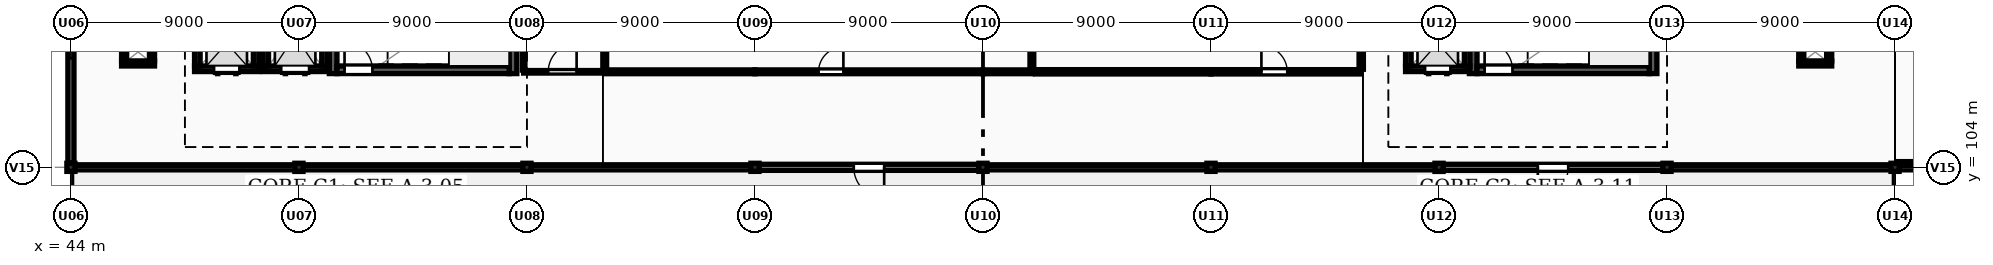
"""IFC4 building model, lengths in metres.
Left out: names, types, materials, properties, quantities, classifications, styles, units other than length and angle.
Written with IfcOpenShell. Run it as: python <this file> out.ifc"""

import sys

from ifc_helpers import new_model, si_unit, direction, frame, frame_2d, origin, origin_2d, place, context, subcontext, project, spatial, rectangle, extrude, element, fill, save


model = new_model("IFC4")
c1 = context("Model", 3, precision=1e-05, world=origin(), true_north=direction((0.0, 1.0)))
c2 = subcontext(c1, "Body", "Model", "MODEL_VIEW")
j1 = project(units=[si_unit("LENGTHUNIT", "METRE"), si_unit("PLANEANGLEUNIT", "RADIAN")], contexts=[c1])
p1 = place(None, origin())
s1 = spatial("IfcSite", under=j1, at=p1, CompositionType="ELEMENT")
p2 = place(p1, origin())
s2 = spatial("IfcBuilding", under=s1, at=p2, CompositionType="ELEMENT")
p3 = place(p2, frame((0.0, 0.0, 16.2)))
s3 = spatial("IfcBuildingStorey", under=s2, at=p3, CompositionType="ELEMENT", Elevation=16.2)
for number, where, z_axis, x_axis in (
    (1, (44.0, 104.0, 0.0), (0.0, 0.0, 1.0), (1.0, 0.0, 0.0)),
    (2, (53.0, 104.0, 0.0), (0.0, 0.0, 1.0), (1.0, 0.0, 0.0)),
    (3, (62.0, 104.0, 0.0), (0.0, 0.0, 1.0), (1.0, 0.0, 0.0)),
    (4, (71.0, 104.0, 0.0), (0.0, 0.0, 1.0), (1.0, 0.0, 0.0)),
    (5, (80.0, 104.0, 0.0), (0.0, 0.0, 1.0), (1.0, 0.0, 0.0)),
    (6, (89.0, 104.0, 0.0), (0.0, 0.0, 1.0), (1.0, 0.0, 0.0)),
    (7, (98.0, 104.0, 0.0), (0.0, 0.0, 1.0), (1.0, 0.0, 0.0)),
    (8, (107.0, 104.0, 0.0), (0.0, 0.0, 1.0), (1.0, 0.0, 0.0)),
    (9, (116.0, 104.0, 0.0), (0.0, 0.0, 1.0), (1.0, 0.0, 0.0)),
):
    element("IfcColumn", number, at=place(p3, frame(where, z_axis=z_axis, x_axis=x_axis)), inside=s3, PredefinedType="COLUMN", context=c2, shape_type="SweptSolid", body=[
        extrude(rectangle(XDim=0.32, YDim=0.32, at=origin_2d()), origin(), (0.0, 0.0, 1.0), 3.9),
    ])
p4 = place(p3, frame((115.84, 104.0, 0.0), z_axis=(0.0, 0.0, 1.0), x_axis=(-1.0, 0.0, 0.0)))
e10 = element("IfcWall", 10, at=p4, inside=s3, PredefinedType="SOLIDWALL", context=c2, shape_type="SweptSolid", body=[
    extrude(rectangle(XDim=8.68, YDim=0.2, at=frame_2d((4.34, 0.0))), origin(), (0.0, 0.0, 1.0), 0.95),
])
p5 = place(p3, frame((106.84, 104.0, 0.0), z_axis=(0.0, 0.0, 1.0), x_axis=(-1.0, 0.0, 0.0)))
e11 = element("IfcWall", 11, at=p5, inside=s3, PredefinedType="SOLIDWALL", context=c2, shape_type="SweptSolid", body=[
    extrude(rectangle(XDim=8.68, YDim=0.24, at=frame_2d((4.34, 0.0))), origin(), (0.0, 0.0, 1.0), 3.01),
])
p6 = place(p5, frame((3.74, 0.0, 0.0)))
e12 = element("IfcOpeningElement", 12, at=p6, cuts=e11, PredefinedType="OPENING", context=c2, shape_type="SweptSolid", body=[
    extrude(rectangle(XDim=1.2, YDim=2.15, at=frame_2d((0.6, 1.075))), frame((0.0, 0.13, 0.0), z_axis=(0.0, -1.0, 0.0), x_axis=(1.0, 0.0, 0.0)), (0.0, 0.0, 1.0), 0.26),
])
for number, where, z_axis, x_axis in (
    (13, (97.84, 104.0, 0.0), (0.0, 0.0, 1.0), (-1.0, 0.0, 0.0)),
    (14, (88.84, 104.0, 0.0), (0.0, 0.0, 1.0), (-1.0, 0.0, 0.0)),
):
    element("IfcWall", number, at=place(p3, frame(where, z_axis=z_axis, x_axis=x_axis)), inside=s3, PredefinedType="SOLIDWALL", context=c2, shape_type="SweptSolid", body=[
        extrude(rectangle(XDim=8.68, YDim=0.2, at=frame_2d((4.34, 0.0))), origin(), (0.0, 0.0, 1.0), 0.95),
    ])
p7 = place(p3, frame((79.84, 104.0, 0.0), z_axis=(0.0, 0.0, 1.0), x_axis=(-1.0, 0.0, 0.0)))
e15 = element("IfcWall", 15, at=p7, inside=s3, PredefinedType="SOLIDWALL", context=c2, shape_type="SweptSolid", body=[
    extrude(rectangle(XDim=8.68, YDim=0.24, at=frame_2d((4.34, 0.0))), origin(), (0.0, 0.0, 1.0), 3.01),
])
p8 = place(p7, frame((3.74, 0.0, 0.0)))
e16 = element("IfcOpeningElement", 16, at=p8, cuts=e15, PredefinedType="OPENING", context=c2, shape_type="SweptSolid", body=[
    extrude(rectangle(XDim=1.2, YDim=2.15, at=frame_2d((0.6, 1.075))), frame((0.0, 0.13, 0.0), z_axis=(0.0, -1.0, 0.0), x_axis=(1.0, 0.0, 0.0)), (0.0, 0.0, 1.0), 0.26),
])
for number, where, z_axis, x_axis in (
    (17, (70.84, 104.0, 0.0), (0.0, 0.0, 1.0), (-1.0, 0.0, 0.0)),
    (18, (61.84, 104.0, 0.0), (0.0, 0.0, 1.0), (-1.0, 0.0, 0.0)),
    (19, (52.84, 104.0, 0.0), (0.0, 0.0, 1.0), (-1.0, 0.0, 0.0)),
):
    element("IfcWall", number, at=place(p3, frame(where, z_axis=z_axis, x_axis=x_axis)), inside=s3, PredefinedType="SOLIDWALL", context=c2, shape_type="SweptSolid", body=[
        extrude(rectangle(XDim=8.68, YDim=0.2, at=frame_2d((4.34, 0.0))), origin(), (0.0, 0.0, 1.0), 0.95),
    ])
p9 = place(p3, frame((44.0, 104.16, 0.0), z_axis=(0.0, 0.0, 1.0), x_axis=(0.0, 1.0, 0.0)))
e20 = element("IfcWall", 20, at=p9, inside=s3, PredefinedType="SOLIDWALL", context=c2, shape_type="SweptSolid", body=[
    extrude(rectangle(XDim=7.68, YDim=0.24, at=frame_2d((3.84, 0.0))), origin(), (0.0, 0.0, 1.0), 3.29),
])
p10 = place(p9, frame((4.14, 0.0, 0.95)))
e21 = element("IfcOpeningElement", 21, at=p10, cuts=e20, PredefinedType="OPENING", context=c2, shape_type="SweptSolid", body=[
    extrude(rectangle(XDim=1.2, YDim=1.65, at=frame_2d((0.6, 0.825))), frame((0.0, 0.13, 0.0), z_axis=(0.0, -1.0, 0.0), x_axis=(1.0, 0.0, 0.0)), (0.0, 0.0, 1.0), 0.26),
])
p11 = place(p3, frame((126.84, 104.0, 0.0), z_axis=(0.0, 0.0, 1.0), x_axis=(-1.0, 0.0, 0.0)))
e22 = element("IfcWall", 22, at=p11, inside=s3, PredefinedType="SOLIDWALL", context=c2, shape_type="SweptSolid", body=[
    extrude(rectangle(XDim=10.68, YDim=0.2, at=frame_2d((5.34, 0.0))), origin(), (0.0, 0.0, 1.0), 0.95),
])
p12 = place(p3, frame((116.1, 104.15, 3.9), z_axis=(0.0, 0.0, 1.0), x_axis=(1.0, 0.0, 0.0)))
e23 = element("IfcWall", 23, at=p12, inside=s3, PredefinedType="PARAPET", context=c2, shape_type="SweptSolid", body=[
    extrude(rectangle(XDim=17.8, YDim=0.15, at=frame_2d((8.9, 0.0))), origin(), (0.0, 0.0, 1.0), 0.95),
])
for number, where, z_axis, x_axis in (
    (24, (54.35, 107.7, 0.0), (0.0, 0.0, 1.0), (0.0, 1.0, 0.0)),
    (25, (61.45, 111.8, 0.0), (0.0, 0.0, 1.0), (0.0, -1.0, 0.0)),
):
    element("IfcWall", number, at=place(p3, frame(where, z_axis=z_axis, x_axis=x_axis)), inside=s3, PredefinedType="SHEAR", context=c2, shape_type="SweptSolid", body=[
        extrude(rectangle(XDim=4.1, YDim=0.3, at=frame_2d((2.05, 0.0))), origin(), (0.0, 0.0, 1.0), 3.65),
    ])
p13 = place(p3, frame((54.5, 107.85, 0.0), z_axis=(0.0, 0.0, 1.0), x_axis=(1.0, 0.0, 0.0)))
e26 = element("IfcWall", 26, at=p13, inside=s3, PredefinedType="SHEAR", context=c2, shape_type="SweptSolid", body=[
    extrude(rectangle(XDim=6.8, YDim=0.3, at=frame_2d((3.4, 0.0))), origin(), (0.0, 0.0, 1.0), 3.65),
])
p14 = place(p13, frame((0.3, 0.0, 0.0)))
e27 = element("IfcOpeningElement", 27, at=p14, cuts=e26, PredefinedType="OPENING", context=c2, shape_type="SweptSolid", body=[
    extrude(rectangle(XDim=1.1, YDim=2.15, at=frame_2d((0.55, 1.075))), frame((0.0, 0.16, 0.0), z_axis=(0.0, -1.0, 0.0), x_axis=(1.0, 0.0, 0.0)), (0.0, 0.0, 1.0), 0.32),
])
p15 = place(p3, frame((54.12, 107.89, 0.0), z_axis=(0.0, 0.0, 1.0), x_axis=(-1.0, 0.0, 0.0)))
e28 = element("IfcWall", 28, at=p15, inside=s3, PredefinedType="SHEAR", context=c2, shape_type="SweptSolid", body=[
    extrude(rectangle(XDim=2.54, YDim=0.22, at=frame_2d((1.27, 0.0))), origin(), (0.0, 0.0, 1.0), 3.65),
])
p16 = place(p15, frame((0.72, 0.0, 0.0)))
e29 = element("IfcOpeningElement", 29, at=p16, cuts=e28, PredefinedType="OPENING", context=c2, shape_type="SweptSolid", body=[
    extrude(rectangle(XDim=1.1, YDim=2.15, at=frame_2d((0.55, 1.075))), frame((0.0, 0.12, 0.0), z_axis=(0.0, -1.0, 0.0), x_axis=(1.0, 0.0, 0.0)), (0.0, 0.0, 1.0), 0.24),
])
for number, where, z_axis, x_axis in (
    (30, (51.69, 108.0, 0.0), (0.0, 0.0, 1.0), (0.0, 1.0, 0.0)),
    (31, (54.01, 110.9, 0.0), (0.0, 0.0, 1.0), (0.0, -1.0, 0.0)),
):
    element("IfcWall", number, at=place(p3, frame(where, z_axis=z_axis, x_axis=x_axis)), inside=s3, PredefinedType="SHEAR", context=c2, shape_type="SweptSolid", body=[
        extrude(rectangle(XDim=2.9, YDim=0.22, at=frame_2d((1.45, 0.0))), origin(), (0.0, 0.0, 1.0), 3.65),
    ])
p17 = place(p3, frame((51.42, 107.89, 0.0), z_axis=(0.0, 0.0, 1.0), x_axis=(-1.0, 0.0, 0.0)))
e32 = element("IfcWall", 32, at=p17, inside=s3, PredefinedType="SHEAR", context=c2, shape_type="SweptSolid", body=[
    extrude(rectangle(XDim=2.54, YDim=0.22, at=frame_2d((1.27, 0.0))), origin(), (0.0, 0.0, 1.0), 3.65),
])
p18 = place(p17, frame((0.77, 0.0, 0.0)))
e33 = element("IfcOpeningElement", 33, at=p18, cuts=e32, PredefinedType="OPENING", context=c2, shape_type="SweptSolid", body=[
    extrude(rectangle(XDim=1.0, YDim=2.15, at=frame_2d((0.5, 1.075))), frame((0.0, 0.12, 0.0), z_axis=(0.0, -1.0, 0.0), x_axis=(1.0, 0.0, 0.0)), (0.0, 0.0, 1.0), 0.24),
])
for number, where, z_axis, x_axis in (
    (34, (48.99, 108.0, 0.0), (0.0, 0.0, 1.0), (0.0, 1.0, 0.0)),
    (35, (51.31, 110.3, 0.0), (0.0, 0.0, 1.0), (0.0, -1.0, 0.0)),
):
    element("IfcWall", number, at=place(p3, frame(where, z_axis=z_axis, x_axis=x_axis)), inside=s3, PredefinedType="SHEAR", context=c2, shape_type="SweptSolid", body=[
        extrude(rectangle(XDim=2.3, YDim=0.22, at=frame_2d((1.15, 0.0))), origin(), (0.0, 0.0, 1.0), 3.65),
    ])
for number, where, z_axis, x_axis in (
    (36, (99.35, 107.7, 0.0), (0.0, 0.0, 1.0), (0.0, 1.0, 0.0)),
    (37, (106.45, 111.8, 0.0), (0.0, 0.0, 1.0), (0.0, -1.0, 0.0)),
):
    element("IfcWall", number, at=place(p3, frame(where, z_axis=z_axis, x_axis=x_axis)), inside=s3, PredefinedType="SHEAR", context=c2, shape_type="SweptSolid", body=[
        extrude(rectangle(XDim=4.1, YDim=0.3, at=frame_2d((2.05, 0.0))), origin(), (0.0, 0.0, 1.0), 3.65),
    ])
p19 = place(p3, frame((99.5, 107.85, 0.0), z_axis=(0.0, 0.0, 1.0), x_axis=(1.0, 0.0, 0.0)))
e38 = element("IfcWall", 38, at=p19, inside=s3, PredefinedType="SHEAR", context=c2, shape_type="SweptSolid", body=[
    extrude(rectangle(XDim=6.8, YDim=0.3, at=frame_2d((3.4, 0.0))), origin(), (0.0, 0.0, 1.0), 3.65),
])
p20 = place(p19, frame((0.3, 0.0, 0.0)))
e39 = element("IfcOpeningElement", 39, at=p20, cuts=e38, PredefinedType="OPENING", context=c2, shape_type="SweptSolid", body=[
    extrude(rectangle(XDim=1.1, YDim=2.15, at=frame_2d((0.55, 1.075))), frame((0.0, 0.16, 0.0), z_axis=(0.0, -1.0, 0.0), x_axis=(1.0, 0.0, 0.0)), (0.0, 0.0, 1.0), 0.32),
])
p21 = place(p3, frame((99.22, 107.89, 0.0), z_axis=(0.0, 0.0, 1.0), x_axis=(-1.0, 0.0, 0.0)))
e40 = element("IfcWall", 40, at=p21, inside=s3, PredefinedType="SHEAR", context=c2, shape_type="SweptSolid", body=[
    extrude(rectangle(XDim=2.54, YDim=0.22, at=frame_2d((1.27, 0.0))), origin(), (0.0, 0.0, 1.0), 3.65),
])
p22 = place(p21, frame((0.77, 0.0, 0.0)))
e41 = element("IfcOpeningElement", 41, at=p22, cuts=e40, PredefinedType="OPENING", context=c2, shape_type="SweptSolid", body=[
    extrude(rectangle(XDim=1.0, YDim=2.15, at=frame_2d((0.5, 1.075))), frame((0.0, 0.12, 0.0), z_axis=(0.0, -1.0, 0.0), x_axis=(1.0, 0.0, 0.0)), (0.0, 0.0, 1.0), 0.24),
])
for number, where, z_axis, x_axis in (
    (42, (96.79, 108.0, 0.0), (0.0, 0.0, 1.0), (0.0, 1.0, 0.0)),
    (43, (99.11, 110.3, 0.0), (0.0, 0.0, 1.0), (0.0, -1.0, 0.0)),
):
    element("IfcWall", number, at=place(p3, frame(where, z_axis=z_axis, x_axis=x_axis)), inside=s3, PredefinedType="SHEAR", context=c2, shape_type="SweptSolid", body=[
        extrude(rectangle(XDim=2.3, YDim=0.22, at=frame_2d((1.15, 0.0))), origin(), (0.0, 0.0, 1.0), 3.65),
    ])
p23 = place(p3, frame((47.3, 108.1, 0.0), z_axis=(0.0, 0.0, 1.0), x_axis=(-1.0, 0.0, 0.0)))
e44 = element("IfcWall", 44, at=p23, inside=s3, PredefinedType="PARTITIONING", context=c2, shape_type="SweptSolid", body=[
    extrude(rectangle(XDim=1.3, YDim=0.2, at=frame_2d((0.65, 0.0))), origin(), (0.0, 0.0, 1.0), 3.65),
])
p24 = place(p3, frame((46.1, 108.2, 0.0), z_axis=(0.0, 0.0, 1.0), x_axis=(0.0, 1.0, 0.0)))
e45 = element("IfcWall", 45, at=p24, inside=s3, PredefinedType="PARTITIONING", context=c2, shape_type="SweptSolid", body=[
    extrude(rectangle(XDim=0.7, YDim=0.2, at=frame_2d((0.35, 0.0))), origin(), (0.0, 0.0, 1.0), 3.65),
])
p25 = place(p3, frame((47.2, 108.9, 0.0), z_axis=(0.0, 0.0, 1.0), x_axis=(0.0, -1.0, 0.0)))
e46 = element("IfcWall", 46, at=p25, inside=s3, PredefinedType="PARTITIONING", context=c2, shape_type="SweptSolid", body=[
    extrude(rectangle(XDim=0.7, YDim=0.2, at=frame_2d((0.35, 0.0))), origin(), (0.0, 0.0, 1.0), 3.25),
])
p26 = place(p3, frame((113.5, 108.1, 0.0), z_axis=(0.0, 0.0, 1.0), x_axis=(-1.0, 0.0, 0.0)))
e47 = element("IfcWall", 47, at=p26, inside=s3, PredefinedType="PARTITIONING", context=c2, shape_type="SweptSolid", body=[
    extrude(rectangle(XDim=1.3, YDim=0.2, at=frame_2d((0.65, 0.0))), origin(), (0.0, 0.0, 1.0), 3.65),
])
for number, where, z_axis, x_axis in (
    (48, (112.3, 108.2, 0.0), (0.0, 0.0, 1.0), (0.0, 1.0, 0.0)),
    (49, (113.4, 108.9, 0.0), (0.0, 0.0, 1.0), (0.0, -1.0, 0.0)),
):
    element("IfcWall", number, at=place(p3, frame(where, z_axis=z_axis, x_axis=x_axis)), inside=s3, PredefinedType="PARTITIONING", context=c2, shape_type="SweptSolid", body=[
        extrude(rectangle(XDim=0.7, YDim=0.2, at=frame_2d((0.35, 0.0))), origin(), (0.0, 0.0, 1.0), 3.65),
    ])
p27 = place(p3, frame((65.07, 107.77, 0.0), z_axis=(0.0, 0.0, 1.0), x_axis=(1.0, 0.0, 0.0)))
e50 = element("IfcWall", 50, at=p27, inside=s3, PredefinedType="PARTITIONING", context=c2, shape_type="SweptSolid", body=[
    extrude(rectangle(XDim=5.93, YDim=0.15, at=frame_2d((2.965, 0.0))), origin(), (0.0, 0.0, 1.0), 3.65),
])
p28 = place(p3, frame((71.0, 107.77, 0.0), z_axis=(0.0, 0.0, 1.0), x_axis=(1.0, 0.0, 0.0)))
e51 = element("IfcWall", 51, at=p28, inside=s3, PredefinedType="PARTITIONING", context=c2, shape_type="SweptSolid", body=[
    extrude(rectangle(XDim=9.0, YDim=0.15, at=frame_2d((4.5, 0.0))), origin(), (0.0, 0.0, 1.0), 3.65),
])
p29 = place(p28, frame((2.51, 0.0, 0.0)))
e52 = element("IfcOpeningElement", 52, at=p29, cuts=e51, PredefinedType="OPENING", context=c2, shape_type="SweptSolid", body=[
    extrude(rectangle(XDim=0.98, YDim=2.1, at=frame_2d((0.49, 1.05))), frame((0.0, 0.085, 0.0), z_axis=(0.0, -1.0, 0.0), x_axis=(1.0, 0.0, 0.0)), (0.0, 0.0, 1.0), 0.17),
])
p30 = place(p3, frame((80.0, 107.77, 0.0), z_axis=(0.0, 0.0, 1.0), x_axis=(1.0, 0.0, 0.0)))
e53 = element("IfcWall", 53, at=p30, inside=s3, PredefinedType="PARTITIONING", context=c2, shape_type="SweptSolid", body=[
    extrude(rectangle(XDim=1.93, YDim=0.15, at=frame_2d((0.965, 0.0))), origin(), (0.0, 0.0, 1.0), 3.65),
])
for number, where, z_axis, x_axis in (
    (54, (65.07, 107.86, 0.0), (0.0, 0.0, 1.0), (0.0, 1.0, 0.0)),
    (55, (81.93, 107.86, 0.0), (0.0, 0.0, 1.0), (0.0, 1.0, 0.0)),
):
    element("IfcWall", number, at=place(p3, frame(where, z_axis=z_axis, x_axis=x_axis)), inside=s3, PredefinedType="PARTITIONING", context=c2, shape_type="SweptSolid", body=[
        extrude(rectangle(XDim=4.14, YDim=0.15, at=frame_2d((2.07, 0.0))), origin(), (0.0, 0.0, 1.0), 3.65),
    ])
p31 = place(p3, frame((82.07, 107.77, 0.0), z_axis=(0.0, 0.0, 1.0), x_axis=(1.0, 0.0, 0.0)))
e56 = element("IfcWall", 56, at=p31, inside=s3, PredefinedType="PARTITIONING", context=c2, shape_type="SweptSolid", body=[
    extrude(rectangle(XDim=6.93, YDim=0.17, at=frame_2d((3.465, 0.0))), origin(), (0.0, 0.0, 1.0), 3.65),
])
p32 = place(p3, frame((89.0, 107.77, 0.0), z_axis=(0.0, 0.0, 1.0), x_axis=(1.0, 0.0, 0.0)))
e57 = element("IfcWall", 57, at=p32, inside=s3, PredefinedType="PARTITIONING", context=c2, shape_type="SweptSolid", body=[
    extrude(rectangle(XDim=5.93, YDim=0.17, at=frame_2d((2.965, 0.0))), origin(), (0.0, 0.0, 1.0), 3.65),
])
p33 = place(p32, frame((1.99, 0.0, 0.0)))
e58 = element("IfcOpeningElement", 58, at=p33, cuts=e57, PredefinedType="OPENING", context=c2, shape_type="SweptSolid", body=[
    extrude(rectangle(XDim=1.02, YDim=2.1, at=frame_2d((0.51, 1.05))), frame((0.0, 0.095, 0.0), z_axis=(0.0, -1.0, 0.0), x_axis=(1.0, 0.0, 0.0)), (0.0, 0.0, 1.0), 0.19),
])
p34 = place(p3, frame((94.93, 107.87, 0.0), z_axis=(0.0, 0.0, 1.0), x_axis=(0.0, 1.0, 0.0)))
e59 = element("IfcWall", 59, at=p34, inside=s3, PredefinedType="PARTITIONING", context=c2, shape_type="SweptSolid", body=[
    extrude(rectangle(XDim=4.13, YDim=0.17, at=frame_2d((2.065, 0.0))), origin(), (0.0, 0.0, 1.0), 3.248),
])
p35 = place(p3, frame((61.87, 107.77, 0.0), z_axis=(0.0, 0.0, 1.0), x_axis=(1.0, 0.0, 0.0)))
e60 = element("IfcWall", 60, at=p35, inside=s3, PredefinedType="PARTITIONING", context=c2, shape_type="SweptSolid", body=[
    extrude(rectangle(XDim=3.06, YDim=0.1, at=frame_2d((1.53, 0.0))), origin(), (0.0, 0.0, 1.0), 3.65),
])
p36 = place(p35, frame((0.97, 0.0, 0.0)))
e61 = element("IfcOpeningElement", 61, at=p36, cuts=e60, PredefinedType="OPENING", context=c2, shape_type="SweptSolid", body=[
    extrude(rectangle(XDim=1.12, YDim=2.15, at=frame_2d((0.56, 1.075))), frame((0.0, 0.06, 0.0), z_axis=(0.0, -1.0, 0.0), x_axis=(1.0, 0.0, 0.0)), (0.0, 0.0, 1.0), 0.12),
])
p37 = place(p3, frame((61.87, 107.835, 0.0), z_axis=(0.0, 0.0, 1.0), x_axis=(0.0, 1.0, 0.0)))
e62 = element("IfcWall", 62, at=p37, inside=s3, PredefinedType="PARTITIONING", context=c2, shape_type="SweptSolid", body=[
    extrude(rectangle(XDim=3.99, YDim=0.1, at=frame_2d((1.995, 0.0))), origin(), (0.0, 0.0, 1.0), 3.65),
])
p38 = place(p6, origin())
e63 = element("IfcDoor", 63, at=p38, inside=s3, OperationType="SINGLE_SWING_RIGHT", PredefinedType="DOOR", context=c2, shape_type="SweptSolid", body=[
    extrude(rectangle(XDim=1.2, YDim=2.15, at=frame_2d((0.6, 1.075))), frame((0.0, 0.025, 0.0), z_axis=(0.0, -1.0, 0.0), x_axis=(1.0, 0.0, 0.0)), (0.0, 0.0, 1.0), 0.05),
])
fill(e12, e63)
p39 = place(p8, origin())
e64 = element("IfcDoor", 64, at=p39, inside=s3, OperationType="SINGLE_SWING_LEFT", PredefinedType="DOOR", context=c2, shape_type="SweptSolid", body=[
    extrude(rectangle(XDim=1.2, YDim=2.15, at=frame_2d((0.6, 1.075))), frame((0.0, 0.025, 0.0), z_axis=(0.0, -1.0, 0.0), x_axis=(1.0, 0.0, 0.0)), (0.0, 0.0, 1.0), 0.05),
])
fill(e16, e64)
p40 = place(p10, origin())
e65 = element("IfcWindow", 65, at=p40, inside=s3, PartitioningType="SINGLE_PANEL", PredefinedType="WINDOW", context=c2, shape_type="SweptSolid", body=[
    extrude(rectangle(XDim=1.2, YDim=1.65, at=frame_2d((0.6, 0.825))), frame((0.0, 0.03, 0.0), z_axis=(0.0, -1.0, 0.0), x_axis=(1.0, 0.0, 0.0)), (0.0, 0.0, 1.0), 0.06),
])
fill(e21, e65)
p41 = place(p14, origin())
e66 = element("IfcDoor", 66, at=p41, inside=s3, OperationType="SINGLE_SWING_LEFT", PredefinedType="DOOR", context=c2, shape_type="SweptSolid", body=[
    extrude(rectangle(XDim=1.1, YDim=2.15, at=frame_2d((0.55, 1.075))), frame((0.0, 0.025, 0.0), z_axis=(0.0, -1.0, 0.0), x_axis=(1.0, 0.0, 0.0)), (0.0, 0.0, 1.0), 0.05),
])
fill(e27, e66)
p42 = place(p16, origin())
e67 = element("IfcDoor", 67, at=p42, inside=s3, OperationType="DOUBLE_DOOR_SLIDING", PredefinedType="DOOR", context=c2, shape_type="SweptSolid", body=[
    extrude(rectangle(XDim=1.1, YDim=2.15, at=frame_2d((0.55, 1.075))), frame((0.0, 0.025, 0.0), z_axis=(0.0, -1.0, 0.0), x_axis=(1.0, 0.0, 0.0)), (0.0, 0.0, 1.0), 0.05),
])
fill(e29, e67)
p43 = place(p18, origin())
e68 = element("IfcDoor", 68, at=p43, inside=s3, OperationType="DOUBLE_DOOR_SLIDING", PredefinedType="DOOR", context=c2, shape_type="SweptSolid", body=[
    extrude(rectangle(XDim=1.0, YDim=2.15, at=frame_2d((0.5, 1.075))), frame((0.0, 0.025, 0.0), z_axis=(0.0, -1.0, 0.0), x_axis=(1.0, 0.0, 0.0)), (0.0, 0.0, 1.0), 0.05),
])
fill(e33, e68)
p44 = place(p20, origin())
e69 = element("IfcDoor", 69, at=p44, inside=s3, OperationType="SINGLE_SWING_LEFT", PredefinedType="DOOR", context=c2, shape_type="SweptSolid", body=[
    extrude(rectangle(XDim=1.1, YDim=2.15, at=frame_2d((0.55, 1.075))), frame((0.0, 0.025, 0.0), z_axis=(0.0, -1.0, 0.0), x_axis=(1.0, 0.0, 0.0)), (0.0, 0.0, 1.0), 0.05),
])
fill(e39, e69)
p45 = place(p22, origin())
e70 = element("IfcDoor", 70, at=p45, inside=s3, OperationType="DOUBLE_DOOR_SLIDING", PredefinedType="DOOR", context=c2, shape_type="SweptSolid", body=[
    extrude(rectangle(XDim=1.0, YDim=2.15, at=frame_2d((0.5, 1.075))), frame((0.0, 0.025, 0.0), z_axis=(0.0, -1.0, 0.0), x_axis=(1.0, 0.0, 0.0)), (0.0, 0.0, 1.0), 0.05),
])
fill(e41, e70)
p46 = place(p29, origin())
e71 = element("IfcDoor", 71, at=p46, inside=s3, OperationType="SINGLE_SWING_RIGHT", PredefinedType="DOOR", context=c2, shape_type="SweptSolid", body=[
    extrude(rectangle(XDim=0.98, YDim=2.1, at=frame_2d((0.49, 1.05))), frame((0.0, 0.025, 0.0), z_axis=(0.0, -1.0, 0.0), x_axis=(1.0, 0.0, 0.0)), (0.0, 0.0, 1.0), 0.05),
])
fill(e52, e71)
p47 = place(p33, origin())
e72 = element("IfcDoor", 72, at=p47, inside=s3, OperationType="SINGLE_SWING_LEFT", PredefinedType="DOOR", context=c2, shape_type="SweptSolid", body=[
    extrude(rectangle(XDim=1.02, YDim=2.1, at=frame_2d((0.51, 1.05))), frame((0.0, 0.025, 0.0), z_axis=(0.0, -1.0, 0.0), x_axis=(1.0, 0.0, 0.0)), (0.0, 0.0, 1.0), 0.05),
])
fill(e58, e72)
p48 = place(p36, origin())
e73 = element("IfcDoor", 73, at=p48, inside=s3, OperationType="SINGLE_SWING_RIGHT", PredefinedType="DOOR", context=c2, shape_type="SweptSolid", body=[
    extrude(rectangle(XDim=1.12, YDim=2.15, at=frame_2d((0.56, 1.075))), frame((0.0, 0.025, 0.0), z_axis=(0.0, -1.0, 0.0), x_axis=(1.0, 0.0, 0.0)), (0.0, 0.0, 1.0), 0.05),
])
fill(e61, e73)
save(model, sys.argv[1])
